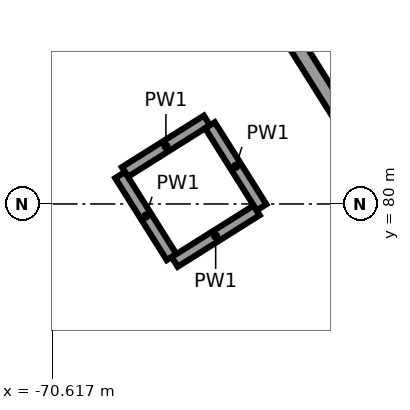
"""IFC4 building model, lengths in metres.
Left out: names, types, materials, properties, quantities, classifications, styles, units other than length and angle.
Written with IfcOpenShell. Run it as: python <this file> out.ifc"""

import sys

from ifc_helpers import new_model, si_unit, direction, frame, frame_2d, origin, place, context, subcontext, project, spatial, rectangle, extrude, element, save


model = new_model("IFC4")
c1 = context("Model", 3, precision=1e-05, world=origin(), true_north=direction((0.0, 1.0)))
c2 = subcontext(c1, "Body", "Model", "MODEL_VIEW")
j1 = project(units=[si_unit("LENGTHUNIT", "METRE"), si_unit("PLANEANGLEUNIT", "RADIAN")], contexts=[c1])
p1 = place(None, origin())
s1 = spatial("IfcSite", under=j1, at=p1, CompositionType="ELEMENT")
p2 = place(p1, origin())
s2 = spatial("IfcBuilding", under=s1, at=p2, CompositionType="ELEMENT")
p3 = place(p2, frame((0.0, 0.0, 12.0)))
s3 = spatial("IfcBuildingStorey", under=s2, at=p3, CompositionType="ELEMENT", Elevation=12.0)
p4 = place(p3, frame((-67.437, 82.143, 0.0), z_axis=(0.0, 0.0, 1.0), x_axis=(0.532038212918, -0.84672034344, 0.0)))
e1 = element("IfcWall", 1, at=p4, inside=s3, PredefinedType="SHEAR", context=c2, shape_type="SweptSolid", body=[
    extrude(rectangle(XDim=3.0, YDim=0.2, at=frame_2d((1.5, 0.0))), origin(), (0.0, 0.0, 1.0), 5.65),
])
for number, where, z_axis, x_axis in (
    (2, (-68.582, 81.099, 0.0), (0.0, 0.0, 1.0), (-0.847, -0.532, 0.0)),
    (3, (-69.725, 80.381, 0.0), (0.0, 0.0, 1.0), (0.532, -0.847, 0.0)),
):
    element("IfcWall", number, at=place(p3, frame(where, z_axis=z_axis, x_axis=x_axis)), inside=s3, PredefinedType="PARTITIONING", context=c2, shape_type="SweptSolid", body=[
        extrude(rectangle(XDim=1.275, YDim=0.15, at=frame_2d((0.638, 0.0))), origin(), (0.0, 0.0, 1.0), 5.65),
    ])
for number, where, z_axis, x_axis in (
    (4, (-69.007, 79.238, 0.0), (0.0, 0.0, 1.0), (0.847, 0.532, 0.0)),
    (5, (-67.864, 79.956, 0.0), (0.0, 0.0, 1.0), (-0.532, 0.847, 0.0)),
):
    element("IfcWall", number, at=place(p3, frame(where, z_axis=z_axis, x_axis=x_axis)), inside=s3, PredefinedType="PARTITIONING", context=c2, shape_type="SweptSolid", body=[
        extrude(rectangle(XDim=1.275, YDim=0.15, at=frame_2d((0.637, 0.0))), origin(), (0.0, 0.0, 1.0), 5.65),
    ])
p5 = place(p3, frame((-72.143, 78.552, 0.0), z_axis=(0.0, 0.0, 1.0), x_axis=(0.532063867314, -0.846704222913, 0.0)))
e6 = element("IfcWall", 6, at=p5, inside=s3, PredefinedType="PARTITIONING", context=c2, shape_type="SweptSolid", body=[
    extrude(rectangle(XDim=5.108, YDim=0.15, at=frame_2d((2.554, 0.0))), origin(), (0.0, 0.0, 1.0), 4.55),
])
p6 = place(p5, frame((3.15, 0.0, 0.0)))
e7 = element("IfcOpeningElement", 7, at=p6, cuts=e6, PredefinedType="OPENING", context=c2, shape_type="SweptSolid", body=[
    extrude(rectangle(XDim=1.8, YDim=2.1, at=frame_2d((0.9, 1.05))), frame((0.0, 0.085, 0.0), z_axis=(0.0, -1.0, 0.0), x_axis=(1.0, 0.0, 0.0)), (0.0, 0.0, 1.0), 0.17),
])
p7 = place(p5, frame((0.05, 0.0, 0.0)))
e8 = element("IfcOpeningElement", 8, at=p7, cuts=e6, PredefinedType="OPENING", context=c2, shape_type="SweptSolid", body=[
    extrude(rectangle(XDim=1.8, YDim=2.1, at=frame_2d((0.9, 1.05))), frame((0.0, 0.085, 0.0), z_axis=(0.0, -1.0, 0.0), x_axis=(1.0, 0.0, 0.0)), (0.0, 0.0, 1.0), 0.17),
])
save(model, sys.argv[1])
